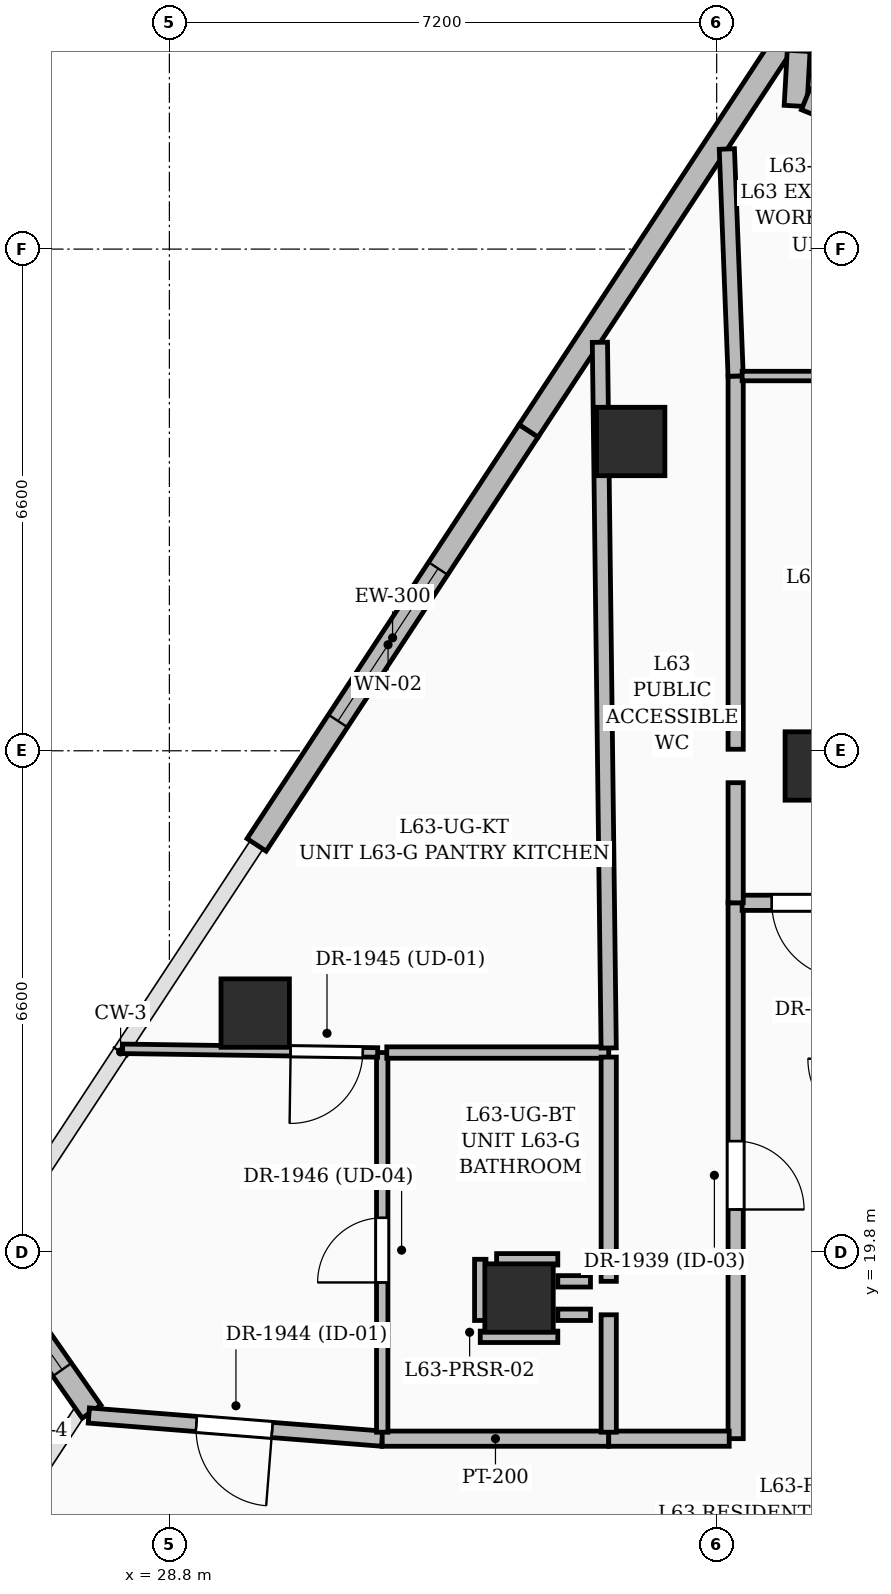
"""IFC4 building model, lengths in metres.
Left out: names, types, materials, properties, quantities, classifications, styles, units other than length and angle.
Written with IfcOpenShell. Run it as: python <this file> out.ifc"""

import sys

from ifc_helpers import new_model, si_unit, direction, frame, frame_2d, origin, origin_2d, place, context, subcontext, project, spatial, rectangle, extrude, element, fill, save


model = new_model("IFC4")
c1 = context("Model", 3, precision=1e-05, world=origin(), true_north=direction((0.0, 1.0)))
c2 = subcontext(c1, "Body", "Model", "MODEL_VIEW")
j1 = project(units=[si_unit("LENGTHUNIT", "METRE"), si_unit("PLANEANGLEUNIT", "RADIAN")], contexts=[c1])
p1 = place(None, origin())
s1 = spatial("IfcSite", under=j1, at=p1, CompositionType="ELEMENT")
p2 = place(p1, origin())
s2 = spatial("IfcBuilding", under=s1, at=p2, CompositionType="ELEMENT")
p3 = place(p2, frame((0.0, 0.0, 244.5)))
s3 = spatial("IfcBuildingStorey", under=s2, at=p3, CompositionType="ELEMENT", Elevation=244.5)
for number, where, z_axis, x_axis in (
    (1, (37.35, 26.2, 0.0), (0.0, 0.0, 1.0), (1.0, 0.0, 0.0)),
    (2, (33.4, 19.2, 0.0), (0.0, 0.0, 1.0), (1.0, 0.0, 0.0)),
    (3, (34.869, 30.469, 0.0), (0.0, 0.0, 1.0), (1.0, 0.0, 0.0)),
    (4, (29.929, 22.949, 0.0), (0.0, 0.0, 1.0), (1.0, 0.0, 0.0)),
):
    element("IfcColumn", number, at=place(p3, frame(where, z_axis=z_axis, x_axis=x_axis)), inside=s3, PredefinedType="COLUMN", context=c2, shape_type="SweptSolid", body=[
        extrude(rectangle(XDim=0.9, YDim=0.9, at=origin_2d()), origin(), (0.0, 0.0, 1.0), 3.75),
    ])
p4 = place(p3, frame((27.776, 17.705, 0.0), z_axis=(0.0, 0.0, 1.0), x_axis=(-0.573607655321, 0.819130183644, 0.0)))
e5 = element("IfcWall", 5, at=p4, inside=s3, PredefinedType="SOLIDWALL", context=c2, shape_type="SweptSolid", body=[
    extrude(rectangle(XDim=2.593, YDim=0.3, at=frame_2d((1.297, 0.0))), origin(), (0.0, 0.0, 1.0), 2.825),
])
p5 = place(p4, frame((0.675, 0.0, 0.8)))
e6 = element("IfcOpeningElement", 6, at=p5, cuts=e5, PredefinedType="OPENING", context=c2, shape_type="SweptSolid", body=[
    extrude(rectangle(XDim=1.2, YDim=1.8, at=frame_2d((0.6, 0.9))), frame((0.0, 0.16, 0.0), z_axis=(0.0, -1.0, 0.0), x_axis=(1.0, 0.0, 0.0)), (0.0, 0.0, 1.0), 0.32),
])
p6 = place(p3, frame((29.947, 25.162, 0.0), z_axis=(0.0, 0.0, 1.0), x_axis=(0.54904258564, 0.83579437612, 0.0)))
e7 = element("IfcWall", 7, at=p6, inside=s3, PredefinedType="SOLIDWALL", context=c2, shape_type="SweptSolid", body=[
    extrude(rectangle(XDim=6.518, YDim=0.3, at=frame_2d((3.259, 0.0))), origin(), (0.0, 0.0, 1.0), 3.5),
])
p7 = place(p6, frame((1.95, 0.0, 0.6)))
e8 = element("IfcOpeningElement", 8, at=p7, cuts=e7, PredefinedType="OPENING", context=c2, shape_type="SweptSolid", body=[
    extrude(rectangle(XDim=2.4, YDim=2.1, at=frame_2d((1.2, 1.05))), frame((0.0, 0.16, 0.0), z_axis=(0.0, -1.0, 0.0), x_axis=(1.0, 0.0, 0.0)), (0.0, 0.0, 1.0), 0.32),
])
p8 = place(p3, frame((33.526, 30.61, 0.0), z_axis=(0.0, 0.0, 1.0), x_axis=(0.54904258564, 0.83579437612, 0.0)))
e9 = element("IfcWall", 9, at=p8, inside=s3, PredefinedType="SOLIDWALL", context=c2, shape_type="SweptSolid", body=[
    extrude(rectangle(XDim=6.518, YDim=0.3, at=frame_2d((3.259, 0.0))), origin(), (0.0, 0.0, 1.0), 3.5),
])
p9 = place(p3, frame((37.079, 35.608, 0.0), z_axis=(0.0, 0.0, 1.0), x_axis=(-0.056196862548, -0.998419707658, 0.0)))
e10 = element("IfcWall", 10, at=p9, inside=s3, PredefinedType="SOLIDWALL", context=c2, shape_type="SweptSolid", body=[
    extrude(rectangle(XDim=0.726, YDim=0.3, at=frame_2d((0.363, 0.0))), origin(), (0.0, 0.0, 1.0), 3.5),
])
p10 = place(p3, frame((37.171, 34.972, 0.0), z_axis=(0.0, 0.0, 1.0), x_axis=(0.927076098221, -0.37487318937, 0.0)))
e11 = element("IfcWall", 11, at=p10, inside=s3, PredefinedType="SOLIDWALL", context=c2, shape_type="SweptSolid", body=[
    extrude(rectangle(XDim=2.126, YDim=0.3, at=frame_2d((1.063, 0.0))), origin(), (0.0, 0.0, 1.0), 3.5),
])
p11 = place(p10, frame((0.275, 0.0, 0.8)))
e12 = element("IfcOpeningElement", 12, at=p11, cuts=e11, PredefinedType="OPENING", context=c2, shape_type="SweptSolid", body=[
    extrude(rectangle(XDim=1.2, YDim=1.8, at=frame_2d((0.6, 0.9))), frame((0.0, 0.16, 0.0), z_axis=(0.0, -1.0, 0.0), x_axis=(1.0, 0.0, 0.0)), (0.0, 0.0, 1.0), 0.32),
])
p12 = place(p3, frame((31.6, 17.35, 0.0), z_axis=(0.0, 0.0, 1.0), x_axis=(-0.996894372276, 0.078750304913, 0.0)))
e13 = element("IfcWall", 13, at=p12, inside=s3, PredefinedType="PARTITIONING", context=c2, shape_type="SweptSolid", body=[
    extrude(rectangle(XDim=3.872, YDim=0.2, at=frame_2d((1.936, 0.0))), origin(), (0.0, 0.0, 1.0), 3.5),
])
p13 = place(p12, frame((1.453, 0.0, 0.0)))
e14 = element("IfcOpeningElement", 14, at=p13, cuts=e13, PredefinedType="OPENING", context=c2, shape_type="SweptSolid", body=[
    extrude(rectangle(XDim=1.0, YDim=2.2, at=frame_2d((0.5, 1.1))), frame((0.0, 0.11, 0.0), z_axis=(0.0, -1.0, 0.0), x_axis=(1.0, 0.0, 0.0)), (0.0, 0.0, 1.0), 0.22),
])
p14 = place(p3, frame((34.58, 17.35, 0.0), z_axis=(0.0, 0.0, 1.0), x_axis=(-1.0, 0.0, 0.0)))
e15 = element("IfcWall", 15, at=p14, inside=s3, PredefinedType="PARTITIONING", context=c2, shape_type="SweptSolid", body=[
    extrude(rectangle(XDim=2.98, YDim=0.2, at=frame_2d((1.49, 0.0))), origin(), (0.0, 0.0, 1.0), 2.685),
])
p15 = place(p3, frame((36.25, 24.4, 0.0), z_axis=(0.0, 0.0, 1.0), x_axis=(0.0, -1.0, 0.0)))
e16 = element("IfcWall", 16, at=p15, inside=s3, PredefinedType="PARTITIONING", context=c2, shape_type="SweptSolid", body=[
    extrude(rectangle(XDim=7.05, YDim=0.2, at=frame_2d((3.525, 0.0))), origin(), (0.0, 0.0, 1.0), 2.685),
])
p16 = place(p15, frame((3.135, 0.0, 0.0)))
e17 = element("IfcOpeningElement", 17, at=p16, cuts=e16, PredefinedType="OPENING", context=c2, shape_type="SweptSolid", body=[
    extrude(rectangle(XDim=0.9, YDim=2.1, at=frame_2d((0.45, 1.05))), frame((0.0, 0.11, 0.0), z_axis=(0.0, -1.0, 0.0), x_axis=(1.0, 0.0, 0.0)), (0.0, 0.0, 1.0), 0.22),
])
p17 = place(p3, frame((36.165, 17.35, 0.0), z_axis=(0.0, 0.0, 1.0), x_axis=(-1.0, 0.0, 0.0)))
e18 = element("IfcWall", 18, at=p17, inside=s3, PredefinedType="PARTITIONING", context=c2, shape_type="SweptSolid", body=[
    extrude(rectangle(XDim=1.585, YDim=0.2, at=frame_2d((0.792, 0.0))), origin(), (0.0, 0.0, 1.0), 3.5),
])
p18 = place(p3, frame((38.115, 24.4, 0.0), z_axis=(0.0, 0.0, 1.0), x_axis=(-1.0, 0.0, 0.0)))
e19 = element("IfcWall", 19, at=p18, inside=s3, PredefinedType="PARTITIONING", context=c2, shape_type="SweptSolid", body=[
    extrude(rectangle(XDim=1.78, YDim=0.2, at=frame_2d((0.89, 0.0))), origin(), (0.0, 0.0, 1.0), 2.685),
])
p19 = place(p18, frame((0.39, 0.0, 0.0)))
e20 = element("IfcOpeningElement", 20, at=p19, cuts=e19, PredefinedType="OPENING", context=c2, shape_type="SweptSolid", body=[
    extrude(rectangle(XDim=1.0, YDim=2.2, at=frame_2d((0.5, 1.1))), frame((0.0, 0.11, 0.0), z_axis=(0.0, -1.0, 0.0), x_axis=(1.0, 0.0, 0.0)), (0.0, 0.0, 1.0), 0.22),
])
p20 = place(p3, frame((31.6, 17.435, 0.0), z_axis=(0.0, 0.0, 1.0), x_axis=(0.0, 1.0, 0.0)))
e21 = element("IfcWall", 21, at=p20, inside=s3, PredefinedType="PARTITIONING", context=c2, shape_type="SweptSolid", body=[
    extrude(rectangle(XDim=4.995, YDim=0.15, at=frame_2d((2.498, 0.0))), origin(), (0.0, 0.0, 1.0), 2.764),
])
p21 = place(p20, frame((1.97, 0.0, 0.0)))
e22 = element("IfcOpeningElement", 22, at=p21, cuts=e21, PredefinedType="OPENING", context=c2, shape_type="SweptSolid", body=[
    extrude(rectangle(XDim=0.85, YDim=2.1, at=frame_2d((0.425, 1.05))), frame((0.0, 0.085, 0.0), z_axis=(0.0, -1.0, 0.0), x_axis=(1.0, 0.0, 0.0)), (0.0, 0.0, 1.0), 0.17),
])
p22 = place(p3, frame((31.54, 22.431, 0.0), z_axis=(0.0, 0.0, 1.0), x_axis=(-0.999897260929, 0.01433414062, 0.0)))
e23 = element("IfcWall", 23, at=p22, inside=s3, PredefinedType="PARTITIONING", context=c2, shape_type="SweptSolid", body=[
    extrude(rectangle(XDim=3.355, YDim=0.125, at=frame_2d((1.678, 0.0))), origin(), (0.0, 0.0, 1.0), 2.764),
])
p23 = place(p22, frame((0.195, 0.0, 0.0)))
e24 = element("IfcOpeningElement", 24, at=p23, cuts=e23, PredefinedType="OPENING", context=c2, shape_type="SweptSolid", body=[
    extrude(rectangle(XDim=0.95, YDim=2.2, at=frame_2d((0.475, 1.1))), frame((0.0, 0.072, 0.0), z_axis=(0.0, -1.0, 0.0), x_axis=(1.0, 0.0, 0.0)), (0.0, 0.0, 1.0), 0.145),
])
p24 = place(p3, frame((34.58, 22.43, 0.0), z_axis=(0.0, 0.0, 1.0), x_axis=(-1.0, 0.0, 0.0)))
e25 = element("IfcWall", 25, at=p24, inside=s3, PredefinedType="PARTITIONING", context=c2, shape_type="SweptSolid", body=[
    extrude(rectangle(XDim=2.92, YDim=0.15, at=frame_2d((1.46, 0.0))), origin(), (0.0, 0.0, 1.0), 2.862),
])
p25 = place(p3, frame((34.58, 17.435, 0.0), z_axis=(0.0, 0.0, 1.0), x_axis=(0.0, 1.0, 0.0)))
e26 = element("IfcWall", 26, at=p25, inside=s3, PredefinedType="PARTITIONING", context=c2, shape_type="SweptSolid", body=[
    extrude(rectangle(XDim=1.545, YDim=0.2, at=frame_2d((0.772, 0.0))), origin(), (0.0, 0.0, 1.0), 3.5),
])
p26 = place(p3, frame((34.58, 19.42, 0.0), z_axis=(0.0, 0.0, 1.0), x_axis=(0.0, 1.0, 0.0)))
e27 = element("IfcWall", 27, at=p26, inside=s3, PredefinedType="PARTITIONING", context=c2, shape_type="SweptSolid", body=[
    extrude(rectangle(XDim=2.95, YDim=0.2, at=frame_2d((1.475, 0.0))), origin(), (0.0, 0.0, 1.0), 2.685),
])
p27 = place(p3, frame((34.58, 22.49, 0.0), z_axis=(0.0, 0.0, 1.0), x_axis=(-0.012437568403, 0.999922650455, 0.0)))
e28 = element("IfcWall", 28, at=p27, inside=s3, PredefinedType="PARTITIONING", context=c2, shape_type="SweptSolid", body=[
    extrude(rectangle(XDim=9.285, YDim=0.2, at=frame_2d((4.642, 0.0))), origin(), (0.0, 0.0, 1.0), 2.82),
])
p28 = place(p3, frame((36.25, 24.4, 0.0), z_axis=(0.0, 0.0, 1.0), x_axis=(0.0, 1.0, 0.0)))
e29 = element("IfcWall", 29, at=p28, inside=s3, PredefinedType="PARTITIONING", context=c2, shape_type="SweptSolid", body=[
    extrude(rectangle(XDim=1.58, YDim=0.2, at=frame_2d((0.79, 0.0))), origin(), (0.0, 0.0, 1.0), 2.685),
])
p29 = place(p3, frame((36.25, 26.42, 0.0), z_axis=(0.0, 0.0, 1.0), x_axis=(0.0, 1.0, 0.0)))
e30 = element("IfcWall", 30, at=p29, inside=s3, PredefinedType="PARTITIONING", context=c2, shape_type="SweptSolid", body=[
    extrude(rectangle(XDim=4.91, YDim=0.2, at=frame_2d((2.455, 0.0))), origin(), (0.0, 0.0, 1.0), 2.764),
])
p30 = place(p3, frame((36.25, 31.33, 0.0), z_axis=(0.0, 0.0, 1.0), x_axis=(-0.03879699026, 0.999247113354, 0.0)))
e31 = element("IfcWall", 31, at=p30, inside=s3, PredefinedType="PARTITIONING", context=c2, shape_type="SweptSolid", body=[
    extrude(rectangle(XDim=2.989, YDim=0.2, at=frame_2d((1.495, 0.0))), origin(), (0.0, 0.0, 1.0), 3.5),
])
p31 = place(p3, frame((39.71, 31.33, 0.0), z_axis=(0.0, 0.0, 1.0), x_axis=(-1.0, 0.0, 0.0)))
e32 = element("IfcWall", 32, at=p31, inside=s3, PredefinedType="PARTITIONING", context=c2, shape_type="SweptSolid", body=[
    extrude(rectangle(XDim=3.375, YDim=0.125, at=frame_2d((1.688, 0.0))), origin(), (0.0, 0.0, 1.0), 3.5),
])
p32 = place(p31, frame((1.196, 0.0, 0.0)))
e33 = element("IfcOpeningElement", 33, at=p32, cuts=e32, PredefinedType="OPENING", context=c2, shape_type="SweptSolid", body=[
    extrude(rectangle(XDim=0.95, YDim=2.2, at=frame_2d((0.475, 1.1))), frame((0.0, 0.072, 0.0), z_axis=(0.0, -1.0, 0.0), x_axis=(1.0, 0.0, 0.0)), (0.0, 0.0, 1.0), 0.145),
])
p33 = place(p3, frame((34.34, 18.98, 0.0), z_axis=(0.0, 0.0, 1.0), x_axis=(-1.0, 0.0, 0.0)))
e34 = element("IfcWall", 34, at=p33, inside=s3, PredefinedType="PARTITIONING", context=c2, shape_type="SweptSolid", body=[
    extrude(rectangle(XDim=0.43, YDim=0.15, at=frame_2d((0.215, 0.0))), origin(), (0.0, 0.0, 1.0), 3.5),
])
p34 = place(p3, frame((33.91, 18.69, 0.0), z_axis=(0.0, 0.0, 1.0), x_axis=(-1.0, 0.0, 0.0)))
e35 = element("IfcWall", 35, at=p34, inside=s3, PredefinedType="PARTITIONING", context=c2, shape_type="SweptSolid", body=[
    extrude(rectangle(XDim=1.02, YDim=0.15, at=frame_2d((0.51, 0.0))), origin(), (0.0, 0.0, 1.0), 2.685),
])
p35 = place(p3, frame((32.89, 18.905, 0.0), z_axis=(0.0, 0.0, 1.0), x_axis=(0.0, 1.0, 0.0)))
e36 = element("IfcWall", 36, at=p35, inside=s3, PredefinedType="PARTITIONING", context=c2, shape_type="SweptSolid", body=[
    extrude(rectangle(XDim=0.805, YDim=0.15, at=frame_2d((0.402, 0.0))), origin(), (0.0, 0.0, 1.0), 2.764),
])
p36 = place(p3, frame((33.105, 19.71, 0.0), z_axis=(0.0, 0.0, 1.0), x_axis=(1.0, 0.0, 0.0)))
e37 = element("IfcWall", 37, at=p36, inside=s3, PredefinedType="PARTITIONING", context=c2, shape_type="SweptSolid", body=[
    extrude(rectangle(XDim=0.805, YDim=0.15, at=frame_2d((0.402, 0.0))), origin(), (0.0, 0.0, 1.0), 2.685),
])
p37 = place(p3, frame((33.91, 19.42, 0.0), z_axis=(0.0, 0.0, 1.0), x_axis=(1.0, 0.0, 0.0)))
e38 = element("IfcWall", 38, at=p37, inside=s3, PredefinedType="PARTITIONING", context=c2, shape_type="SweptSolid", body=[
    extrude(rectangle(XDim=0.43, YDim=0.15, at=frame_2d((0.215, 0.0))), origin(), (0.0, 0.0, 1.0), 3.5),
])
p38 = place(p5, origin())
e39 = element("IfcWindow", 39, at=p38, inside=s3, PartitioningType="SINGLE_PANEL", PredefinedType="WINDOW", context=c2, shape_type="SweptSolid", body=[
    extrude(rectangle(XDim=1.2, YDim=1.8, at=frame_2d((0.6, 0.9))), frame((0.0, 0.03, 0.0), z_axis=(0.0, -1.0, 0.0), x_axis=(1.0, 0.0, 0.0)), (0.0, 0.0, 1.0), 0.06),
])
fill(e6, e39)
p39 = place(p7, origin())
e40 = element("IfcWindow", 40, at=p39, inside=s3, PartitioningType="SINGLE_PANEL", PredefinedType="WINDOW", context=c2, shape_type="SweptSolid", body=[
    extrude(rectangle(XDim=2.4, YDim=2.1, at=frame_2d((1.2, 1.05))), frame((0.0, 0.03, 0.0), z_axis=(0.0, -1.0, 0.0), x_axis=(1.0, 0.0, 0.0)), (0.0, 0.0, 1.0), 0.06),
])
fill(e8, e40)
p40 = place(p16, origin())
e41 = element("IfcDoor", 41, at=p40, inside=s3, OperationType="SINGLE_SWING_RIGHT", PredefinedType="DOOR", context=c2, shape_type="SweptSolid", body=[
    extrude(rectangle(XDim=0.9, YDim=2.1, at=frame_2d((0.45, 1.05))), frame((0.0, 0.025, 0.0), z_axis=(0.0, -1.0, 0.0), x_axis=(1.0, 0.0, 0.0)), (0.0, 0.0, 1.0), 0.05),
])
fill(e17, e41)
p41 = place(p13, origin())
e42 = element("IfcDoor", 42, at=p41, inside=s3, OperationType="SINGLE_SWING_LEFT", PredefinedType="DOOR", context=c2, shape_type="SweptSolid", body=[
    extrude(rectangle(XDim=1.0, YDim=2.2, at=frame_2d((0.5, 1.1))), frame((0.0, 0.025, 0.0), z_axis=(0.0, -1.0, 0.0), x_axis=(1.0, 0.0, 0.0)), (0.0, 0.0, 1.0), 0.05),
])
fill(e14, e42)
p42 = place(p23, origin())
e43 = element("IfcDoor", 43, at=p42, inside=s3, OperationType="SINGLE_SWING_RIGHT", PredefinedType="DOOR", context=c2, shape_type="SweptSolid", body=[
    extrude(rectangle(XDim=0.95, YDim=2.2, at=frame_2d((0.475, 1.1))), frame((0.0, 0.025, 0.0), z_axis=(0.0, -1.0, 0.0), x_axis=(1.0, 0.0, 0.0)), (0.0, 0.0, 1.0), 0.05),
])
fill(e24, e43)
p43 = place(p21, origin())
e44 = element("IfcDoor", 44, at=p43, inside=s3, OperationType="SINGLE_SWING_LEFT", PredefinedType="DOOR", context=c2, shape_type="SweptSolid", body=[
    extrude(rectangle(XDim=0.85, YDim=2.1, at=frame_2d((0.425, 1.05))), frame((0.0, 0.025, 0.0), z_axis=(0.0, -1.0, 0.0), x_axis=(1.0, 0.0, 0.0)), (0.0, 0.0, 1.0), 0.05),
])
fill(e22, e44)
p44 = place(p19, origin())
e45 = element("IfcDoor", 45, at=p44, inside=s3, OperationType="SINGLE_SWING_LEFT", PredefinedType="DOOR", context=c2, shape_type="SweptSolid", body=[
    extrude(rectangle(XDim=1.0, YDim=2.2, at=frame_2d((0.5, 1.1))), frame((0.0, 0.025, 0.0), z_axis=(0.0, -1.0, 0.0), x_axis=(1.0, 0.0, 0.0)), (0.0, 0.0, 1.0), 0.05),
])
fill(e20, e45)
save(model, sys.argv[1])
